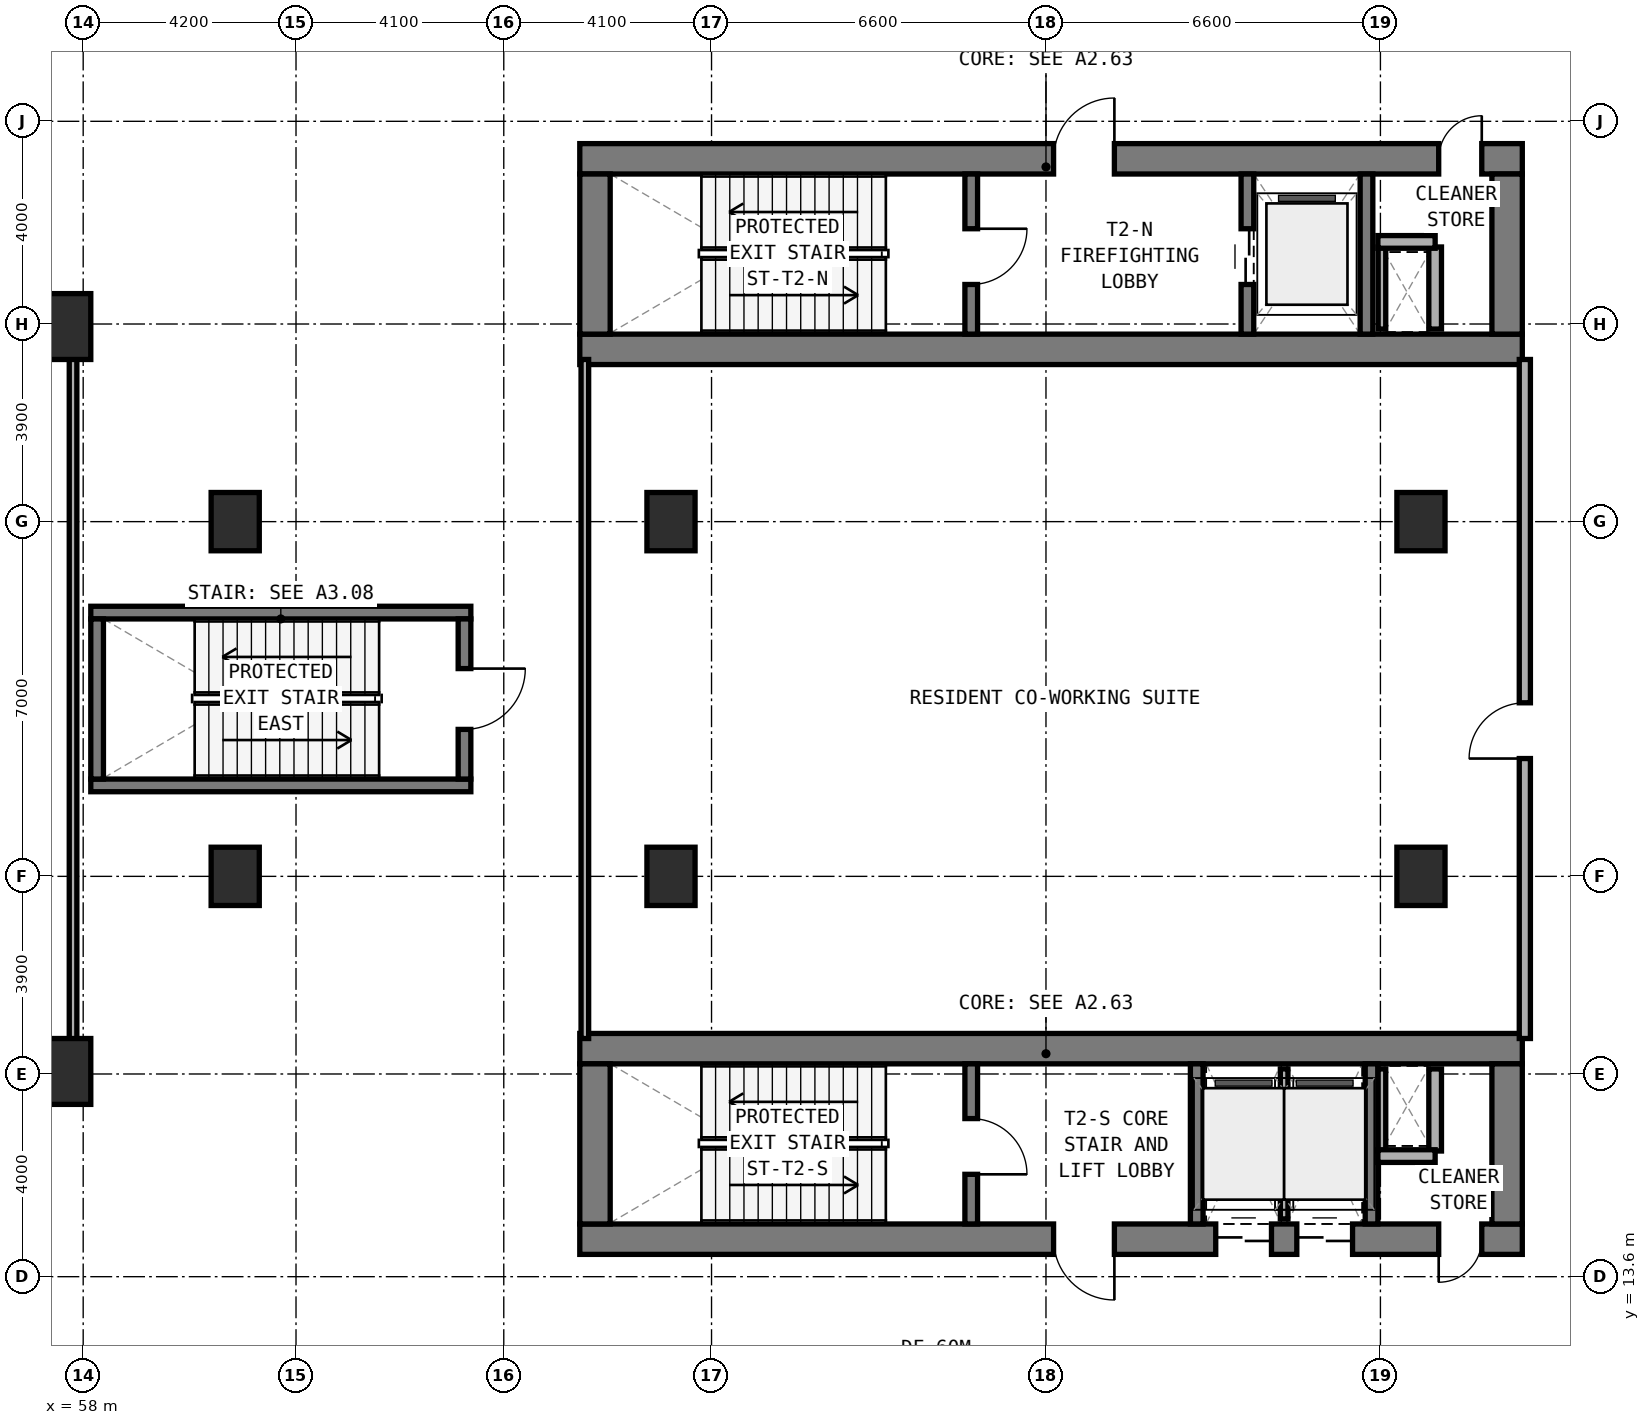
"""IFC4 building model, lengths in metres.
Left out: names, types, materials, properties, quantities, classifications, styles, units other than length and angle.
Written with IfcOpenShell. Run it as: python <this file> out.ifc"""

import sys

from ifc_helpers import new_model, si_unit, direction, frame, frame_2d, origin, origin_2d, place, context, subcontext, project, spatial, rectangle, extrude, element, fill, save


model = new_model("IFC4")
c1 = context("Model", 3, precision=1e-05, world=origin(), true_north=direction((0.0, 1.0)))
c2 = subcontext(c1, "Body", "Model", "MODEL_VIEW")
j1 = project(units=[si_unit("LENGTHUNIT", "METRE"), si_unit("PLANEANGLEUNIT", "RADIAN")], contexts=[c1])
p1 = place(None, origin())
s1 = spatial("IfcSite", under=j1, at=p1, CompositionType="ELEMENT")
p2 = place(p1, origin())
s2 = spatial("IfcBuilding", under=s1, at=p2, CompositionType="ELEMENT")
p3 = place(p2, frame((0.0, 0.0, 10.2)))
s3 = spatial("IfcBuildingStorey", under=s2, at=p3, CompositionType="ELEMENT", Elevation=10.2)
p4 = place(p3, frame((67.8, 31.9, 0.0), z_axis=(0.0, 0.0, 1.0), x_axis=(1.0, 0.0, 0.0)))
e1 = element("IfcWall", 1, at=p4, inside=s3, PredefinedType="SHEAR", context=c2, shape_type="SweptSolid", body=[
    extrude(rectangle(XDim=18.6, YDim=0.6, at=frame_2d((9.3, 0.0))), origin(), (0.0, 0.0, 1.0), 4.8),
])
p5 = place(p3, frame((67.8, 35.66, 0.0), z_axis=(0.0, 0.0, 1.0), x_axis=(1.0, 0.0, 0.0)))
e2 = element("IfcWall", 2, at=p5, inside=s3, PredefinedType="SHEAR", context=c2, shape_type="SweptSolid", body=[
    extrude(rectangle(XDim=18.6, YDim=0.6, at=frame_2d((9.3, 0.0))), origin(), (0.0, 0.0, 1.0), 4.8),
])
p6 = place(p5, frame((9.35, 0.0, 0.0)))
e3 = element("IfcOpeningElement", 3, at=p6, cuts=e2, PredefinedType="OPENING", context=c2, shape_type="SweptSolid", body=[
    extrude(rectangle(XDim=1.2, YDim=2.15, at=frame_2d((0.6, 1.075))), frame((0.0, 0.31, 0.0), z_axis=(0.0, -1.0, 0.0), x_axis=(1.0, 0.0, 0.0)), (0.0, 0.0, 1.0), 0.62),
])
p7 = place(p5, frame((16.95, 0.0, 0.0)))
e4 = element("IfcOpeningElement", 4, at=p7, cuts=e2, PredefinedType="OPENING", context=c2, shape_type="SweptSolid", body=[
    extrude(rectangle(XDim=0.85, YDim=2.1, at=frame_2d((0.425, 1.05))), frame((0.0, 0.31, 0.0), z_axis=(0.0, -1.0, 0.0), x_axis=(1.0, 0.0, 0.0)), (0.0, 0.0, 1.0), 0.62),
])
for number, where, z_axis, x_axis in (
    (5, (68.1, 32.2, 0.0), (0.0, 0.0, 1.0), (0.0, 1.0, 0.0)),
    (6, (86.1, 32.2, 0.0), (0.0, 0.0, 1.0), (0.0, 1.0, 0.0)),
):
    element("IfcWall", number, at=place(p3, frame(where, z_axis=z_axis, x_axis=x_axis)), inside=s3, PredefinedType="SHEAR", context=c2, shape_type="SweptSolid", body=[
        extrude(rectangle(XDim=3.16, YDim=0.6, at=frame_2d((1.58, 0.0))), origin(), (0.0, 0.0, 1.0), 4.8),
    ])
p8 = place(p3, frame((75.525, 32.2, 0.0), z_axis=(0.0, 0.0, 1.0), x_axis=(0.0, 1.0, 0.0)))
e7 = element("IfcWall", 7, at=p8, inside=s3, PredefinedType="STANDARD", context=c2, shape_type="SweptSolid", body=[
    extrude(rectangle(XDim=3.16, YDim=0.25, at=frame_2d((1.58, 0.0))), origin(), (0.0, 0.0, 1.0), 4.45),
])
p9 = place(p8, frame((0.98, 0.0, 0.0)))
e8 = element("IfcOpeningElement", 8, at=p9, cuts=e7, PredefinedType="OPENING", context=c2, shape_type="SweptSolid", body=[
    extrude(rectangle(XDim=1.1, YDim=2.15, at=frame_2d((0.55, 1.075))), frame((0.0, 0.135, 0.0), z_axis=(0.0, -1.0, 0.0), x_axis=(1.0, 0.0, 0.0)), (0.0, 0.0, 1.0), 0.27),
])
p10 = place(p3, frame((80.975, 32.2, 0.0), z_axis=(0.0, 0.0, 1.0), x_axis=(0.0, 1.0, 0.0)))
e9 = element("IfcWall", 9, at=p10, inside=s3, PredefinedType="STANDARD", context=c2, shape_type="SweptSolid", body=[
    extrude(rectangle(XDim=3.16, YDim=0.25, at=frame_2d((1.58, 0.0))), origin(), (0.0, 0.0, 1.0), 4.45),
])
p11 = place(p10, frame((0.98, 0.0, 0.0)))
e10 = element("IfcOpeningElement", 10, at=p11, cuts=e9, PredefinedType="OPENING", context=c2, shape_type="SweptSolid", body=[
    extrude(rectangle(XDim=1.1, YDim=2.15, at=frame_2d((0.55, 1.075))), frame((0.0, 0.135, 0.0), z_axis=(0.0, -1.0, 0.0), x_axis=(1.0, 0.0, 0.0)), (0.0, 0.0, 1.0), 0.27),
])
p12 = place(p3, frame((83.325, 32.2, 0.0), z_axis=(0.0, 0.0, 1.0), x_axis=(0.0, 1.0, 0.0)))
e11 = element("IfcWall", 11, at=p12, inside=s3, PredefinedType="STANDARD", context=c2, shape_type="SweptSolid", body=[
    extrude(rectangle(XDim=3.16, YDim=0.25, at=frame_2d((1.58, 0.0))), origin(), (0.0, 0.0, 1.0), 4.45),
])
p13 = place(p3, frame((67.8, 14.34, 0.0), z_axis=(0.0, 0.0, 1.0), x_axis=(1.0, 0.0, 0.0)))
e12 = element("IfcWall", 12, at=p13, inside=s3, PredefinedType="SHEAR", context=c2, shape_type="SweptSolid", body=[
    extrude(rectangle(XDim=18.6, YDim=0.6, at=frame_2d((9.3, 0.0))), origin(), (0.0, 0.0, 1.0), 4.8),
])
p14 = place(p13, frame((9.35, 0.0, 0.0)))
e13 = element("IfcOpeningElement", 13, at=p14, cuts=e12, PredefinedType="OPENING", context=c2, shape_type="SweptSolid", body=[
    extrude(rectangle(XDim=1.2, YDim=2.15, at=frame_2d((0.6, 1.075))), frame((0.0, 0.31, 0.0), z_axis=(0.0, -1.0, 0.0), x_axis=(1.0, 0.0, 0.0)), (0.0, 0.0, 1.0), 0.62),
])
p15 = place(p13, frame((16.95, 0.0, 0.0)))
e14 = element("IfcOpeningElement", 14, at=p15, cuts=e12, PredefinedType="OPENING", context=c2, shape_type="SweptSolid", body=[
    extrude(rectangle(XDim=0.85, YDim=2.1, at=frame_2d((0.425, 1.05))), frame((0.0, 0.31, 0.0), z_axis=(0.0, -1.0, 0.0), x_axis=(1.0, 0.0, 0.0)), (0.0, 0.0, 1.0), 0.62),
])
p16 = place(p13, frame((12.55, 0.0, 0.0)))
e15 = element("IfcOpeningElement", 15, at=p16, cuts=e12, PredefinedType="OPENING", context=c2, shape_type="SweptSolid", body=[
    extrude(rectangle(XDim=1.1, YDim=2.15, at=frame_2d((0.55, 1.075))), frame((0.0, 0.31, 0.0), z_axis=(0.0, -1.0, 0.0), x_axis=(1.0, 0.0, 0.0)), (0.0, 0.0, 1.0), 0.62),
])
p17 = place(p13, frame((14.15, 0.0, 0.0)))
e16 = element("IfcOpeningElement", 16, at=p17, cuts=e12, PredefinedType="OPENING", context=c2, shape_type="SweptSolid", body=[
    extrude(rectangle(XDim=1.1, YDim=2.15, at=frame_2d((0.55, 1.075))), frame((0.0, 0.31, 0.0), z_axis=(0.0, -1.0, 0.0), x_axis=(1.0, 0.0, 0.0)), (0.0, 0.0, 1.0), 0.62),
])
p18 = place(p3, frame((67.8, 18.1, 0.0), z_axis=(0.0, 0.0, 1.0), x_axis=(1.0, 0.0, 0.0)))
e17 = element("IfcWall", 17, at=p18, inside=s3, PredefinedType="SHEAR", context=c2, shape_type="SweptSolid", body=[
    extrude(rectangle(XDim=18.6, YDim=0.6, at=frame_2d((9.3, 0.0))), origin(), (0.0, 0.0, 1.0), 4.8),
])
for number, where, z_axis, x_axis in (
    (18, (68.1, 14.64, 0.0), (0.0, 0.0, 1.0), (0.0, 1.0, 0.0)),
    (19, (86.1, 14.64, 0.0), (0.0, 0.0, 1.0), (0.0, 1.0, 0.0)),
):
    element("IfcWall", number, at=place(p3, frame(where, z_axis=z_axis, x_axis=x_axis)), inside=s3, PredefinedType="SHEAR", context=c2, shape_type="SweptSolid", body=[
        extrude(rectangle(XDim=3.16, YDim=0.6, at=frame_2d((1.58, 0.0))), origin(), (0.0, 0.0, 1.0), 4.8),
    ])
p19 = place(p3, frame((75.525, 14.64, 0.0), z_axis=(0.0, 0.0, 1.0), x_axis=(0.0, 1.0, 0.0)))
e20 = element("IfcWall", 20, at=p19, inside=s3, PredefinedType="STANDARD", context=c2, shape_type="SweptSolid", body=[
    extrude(rectangle(XDim=3.16, YDim=0.25, at=frame_2d((1.58, 0.0))), origin(), (0.0, 0.0, 1.0), 4.45),
])
p20 = place(p19, frame((0.98, 0.0, 0.0)))
e21 = element("IfcOpeningElement", 21, at=p20, cuts=e20, PredefinedType="OPENING", context=c2, shape_type="SweptSolid", body=[
    extrude(rectangle(XDim=1.1, YDim=2.15, at=frame_2d((0.55, 1.075))), frame((0.0, 0.135, 0.0), z_axis=(0.0, -1.0, 0.0), x_axis=(1.0, 0.0, 0.0)), (0.0, 0.0, 1.0), 0.27),
])
for number, where, z_axis, x_axis in (
    (22, (79.975, 14.64, 0.0), (0.0, 0.0, 1.0), (0.0, 1.0, 0.0)),
    (23, (83.425, 14.64, 0.0), (0.0, 0.0, 1.0), (0.0, 1.0, 0.0)),
):
    element("IfcWall", number, at=place(p3, frame(where, z_axis=z_axis, x_axis=x_axis)), inside=s3, PredefinedType="STANDARD", context=c2, shape_type="SweptSolid", body=[
        extrude(rectangle(XDim=3.16, YDim=0.25, at=frame_2d((1.58, 0.0))), origin(), (0.0, 0.0, 1.0), 4.45),
    ])
for number, where, z_axis, x_axis in (
    (24, (58.15, 23.295, 0.0), (0.0, 0.0, 1.0), (1.0, 0.0, 0.0)),
    (25, (58.15, 26.705, 0.0), (0.0, 0.0, 1.0), (1.0, 0.0, 0.0)),
):
    element("IfcWall", number, at=place(p3, frame(where, z_axis=z_axis, x_axis=x_axis)), inside=s3, PredefinedType="STANDARD", context=c2, shape_type="SweptSolid", body=[
        extrude(rectangle(XDim=7.5, YDim=0.25, at=frame_2d((3.75, 0.0))), origin(), (0.0, 0.0, 1.0), 4.8),
    ])
p21 = place(p3, frame((58.275, 23.42, 0.0), z_axis=(0.0, 0.0, 1.0), x_axis=(0.0, 1.0, 0.0)))
e26 = element("IfcWall", 26, at=p21, inside=s3, PredefinedType="STANDARD", context=c2, shape_type="SweptSolid", body=[
    extrude(rectangle(XDim=3.16, YDim=0.25, at=frame_2d((1.58, 0.0))), origin(), (0.0, 0.0, 1.0), 4.8),
])
p22 = place(p3, frame((65.525, 23.42, 0.0), z_axis=(0.0, 0.0, 1.0), x_axis=(0.0, 1.0, 0.0)))
e27 = element("IfcWall", 27, at=p22, inside=s3, PredefinedType="STANDARD", context=c2, shape_type="SweptSolid", body=[
    extrude(rectangle(XDim=3.16, YDim=0.25, at=frame_2d((1.58, 0.0))), origin(), (0.0, 0.0, 1.0), 4.8),
])
p23 = place(p22, frame((0.98, 0.0, 0.0)))
e28 = element("IfcOpeningElement", 28, at=p23, cuts=e27, PredefinedType="OPENING", context=c2, shape_type="SweptSolid", body=[
    extrude(rectangle(XDim=1.2, YDim=2.15, at=frame_2d((0.6, 1.075))), frame((0.0, 0.135, 0.0), z_axis=(0.0, -1.0, 0.0), x_axis=(1.0, 0.0, 0.0)), (0.0, 0.0, 1.0), 0.27),
])
for number, where, z_axis, x_axis in (
    (29, (61.0, 21.5, 0.0), (0.0, 0.0, 1.0), (1.0, 0.0, 0.0)),
    (30, (61.0, 28.5, 0.0), (0.0, 0.0, 1.0), (1.0, 0.0, 0.0)),
    (31, (69.6, 21.5, 0.0), (0.0, 0.0, 1.0), (1.0, 0.0, 0.0)),
    (32, (69.6, 28.5, 0.0), (0.0, 0.0, 1.0), (1.0, 0.0, 0.0)),
    (33, (84.4, 21.5, 0.0), (0.0, 0.0, 1.0), (1.0, 0.0, 0.0)),
    (34, (84.4, 28.5, 0.0), (0.0, 0.0, 1.0), (1.0, 0.0, 0.0)),
):
    element("IfcColumn", number, at=place(p3, frame(where, z_axis=z_axis, x_axis=x_axis)), inside=s3, PredefinedType="COLUMN", context=c2, shape_type="SweptSolid", body=[
        extrude(rectangle(XDim=0.95, YDim=1.15, at=origin_2d()), origin(), (0.0, 0.0, 1.0), 4.8),
    ])
for number, where, z_axis, x_axis in (
    (35, (57.6, 17.65, 0.0), (0.0, 0.0, 1.0), (1.0, 0.0, 0.0)),
    (36, (57.6, 32.35, 0.0), (0.0, 0.0, 1.0), (1.0, 0.0, 0.0)),
):
    element("IfcColumn", number, at=place(p3, frame(where, z_axis=z_axis, x_axis=x_axis)), inside=s3, PredefinedType="COLUMN", context=c2, shape_type="SweptSolid", body=[
        extrude(rectangle(XDim=1.1, YDim=1.3, at=origin_2d()), origin(), (0.0, 0.0, 1.0), 4.8),
    ])
p24 = place(p3, frame((83.63, 32.3, 0.0), z_axis=(0.0, 0.0, 1.0), x_axis=(0.0, 1.0, 0.0)))
e37 = element("IfcWall", 37, at=p24, inside=s3, PredefinedType="PARTITIONING", context=c2, shape_type="SweptSolid", body=[
    extrude(rectangle(XDim=1.62, YDim=0.15, at=frame_2d((0.81, 0.0))), origin(), (0.0, 0.0, 1.0), 3.925),
])
p25 = place(p3, frame((84.68, 32.3, 0.0), z_axis=(0.0, 0.0, 1.0), x_axis=(0.0, 1.0, 0.0)))
e38 = element("IfcWall", 38, at=p25, inside=s3, PredefinedType="SOLIDWALL", context=c2, shape_type="SweptSolid", body=[
    extrude(rectangle(XDim=1.62, YDim=0.25, at=frame_2d((0.81, 0.0))), origin(), (0.0, 0.0, 1.0), 4.45),
])
p26 = place(p3, frame((83.55, 34.02, 0.0), z_axis=(0.0, 0.0, 1.0), x_axis=(1.0, 0.0, 0.0)))
e39 = element("IfcWall", 39, at=p26, inside=s3, PredefinedType="SOLIDWALL", context=c2, shape_type="SweptSolid", body=[
    extrude(rectangle(XDim=1.13, YDim=0.25, at=frame_2d((0.565, 0.0))), origin(), (0.0, 0.0, 1.0), 4.45),
])
p27 = place(p3, frame((83.63, 16.08, 0.0), z_axis=(0.0, 0.0, 1.0), x_axis=(0.0, 1.0, 0.0)))
e40 = element("IfcWall", 40, at=p27, inside=s3, PredefinedType="PARTITIONING", context=c2, shape_type="SweptSolid", body=[
    extrude(rectangle(XDim=1.62, YDim=0.15, at=frame_2d((0.81, 0.0))), origin(), (0.0, 0.0, 1.0), 3.925),
])
p28 = place(p3, frame((84.68, 16.08, 0.0), z_axis=(0.0, 0.0, 1.0), x_axis=(0.0, 1.0, 0.0)))
e41 = element("IfcWall", 41, at=p28, inside=s3, PredefinedType="SOLIDWALL", context=c2, shape_type="SweptSolid", body=[
    extrude(rectangle(XDim=1.62, YDim=0.25, at=frame_2d((0.81, 0.0))), origin(), (0.0, 0.0, 1.0), 4.45),
])
p29 = place(p3, frame((83.55, 15.98, 0.0), z_axis=(0.0, 0.0, 1.0), x_axis=(1.0, 0.0, 0.0)))
e42 = element("IfcWall", 42, at=p29, inside=s3, PredefinedType="SOLIDWALL", context=c2, shape_type="SweptSolid", body=[
    extrude(rectangle(XDim=1.13, YDim=0.25, at=frame_2d((0.565, 0.0))), origin(), (0.0, 0.0, 1.0), 4.45),
])
p30 = place(p3, frame((81.7, 14.74, 0.0), z_axis=(0.0, 0.0, 1.0), x_axis=(0.0, 1.0, 0.0)))
e43 = element("IfcWall", 43, at=p30, inside=s3, PredefinedType="PARTITIONING", context=c2, shape_type="SweptSolid", body=[
    extrude(rectangle(XDim=2.96, YDim=0.15, at=frame_2d((1.48, 0.0))), origin(), (0.0, 0.0, 1.0), 4.45),
])
p31 = place(p3, frame((57.8, 18.1, 0.0), z_axis=(0.0, 0.0, 1.0), x_axis=(0.0, 1.0, 0.0)))
e44 = element("IfcWall", 44, at=p31, inside=s3, PredefinedType="PARTITIONING", context=c2, shape_type="SweptSolid", body=[
    extrude(rectangle(XDim=13.8, YDim=0.15, at=frame_2d((6.9, 0.0))), origin(), (0.0, 0.0, 1.0), 3.725),
])
for number, where, z_axis, x_axis in (
    (45, (41.1, 18.0, 0.0), (0.0, 0.0, 1.0), (1.0, 0.0, 0.0)),
    (46, (41.1, 32.0, 0.0), (0.0, 0.0, 1.0), (1.0, 0.0, 0.0)),
):
    element("IfcWall", number, at=place(p3, frame(where, z_axis=z_axis, x_axis=x_axis)), inside=s3, PredefinedType="PARTITIONING", context=c2, shape_type="SweptSolid", body=[
        extrude(rectangle(XDim=16.6, YDim=0.15, at=frame_2d((8.3, 0.0))), origin(), (0.0, 0.0, 1.0), 3.725),
    ])
p32 = place(p3, frame((67.9, 18.3, 0.0), z_axis=(0.0, 0.0, 1.0), x_axis=(0.0, 1.0, 0.0)))
e47 = element("IfcWall", 47, at=p32, inside=s3, PredefinedType="PARTITIONING", context=c2, shape_type="SweptSolid", body=[
    extrude(rectangle(XDim=13.4, YDim=0.15, at=frame_2d((6.7, 0.0))), origin(), (0.0, 0.0, 1.0), 3.925),
])
p33 = place(p3, frame((86.45, 18.3, 0.0), z_axis=(0.0, 0.0, 1.0), x_axis=(0.0, 1.0, 0.0)))
e48 = element("IfcWall", 48, at=p33, inside=s3, PredefinedType="SOLIDWALL", context=c2, shape_type="SweptSolid", body=[
    extrude(rectangle(XDim=13.4, YDim=0.22, at=frame_2d((6.7, 0.0))), origin(), (0.0, 0.0, 1.0), 3.925),
])
p34 = place(p33, frame((5.525, 0.0, 0.0)))
e49 = element("IfcOpeningElement", 49, at=p34, cuts=e48, PredefinedType="OPENING", context=c2, shape_type="SweptSolid", body=[
    extrude(rectangle(XDim=1.1, YDim=2.1, at=frame_2d((0.55, 1.05))), frame((0.0, 0.12, 0.0), z_axis=(0.0, -1.0, 0.0), x_axis=(1.0, 0.0, 0.0)), (0.0, 0.0, 1.0), 0.24),
])
p35 = place(p9, frame((1.1, 0.0, 0.0), z_axis=(0.0, 0.0, 1.0), x_axis=(-1.0, 0.0, 0.0)))
e50 = element("IfcDoor", 50, at=p35, inside=s3, OperationType="SINGLE_SWING_LEFT", PredefinedType="DOOR", context=c2, shape_type="SweptSolid", body=[
    extrude(rectangle(XDim=1.1, YDim=2.15, at=frame_2d((0.55, 1.075))), frame((0.0, 0.025, 0.0), z_axis=(0.0, -1.0, 0.0), x_axis=(1.0, 0.0, 0.0)), (0.0, 0.0, 1.0), 0.05),
])
fill(e8, e50)
p36 = place(p6, origin())
e51 = element("IfcDoor", 51, at=p36, inside=s3, OperationType="SINGLE_SWING_RIGHT", PredefinedType="DOOR", context=c2, shape_type="SweptSolid", body=[
    extrude(rectangle(XDim=1.2, YDim=2.15, at=frame_2d((0.6, 1.075))), frame((0.0, 0.025, 0.0), z_axis=(0.0, -1.0, 0.0), x_axis=(1.0, 0.0, 0.0)), (0.0, 0.0, 1.0), 0.05),
])
fill(e3, e51)
p37 = place(p11, origin())
e52 = element("IfcDoor", 52, at=p37, inside=s3, OperationType="DOUBLE_DOOR_SLIDING", PredefinedType="DOOR", context=c2, shape_type="SweptSolid", body=[
    extrude(rectangle(XDim=1.1, YDim=2.15, at=frame_2d((0.55, 1.075))), frame((0.0, 0.025, 0.0), z_axis=(0.0, -1.0, 0.0), x_axis=(1.0, 0.0, 0.0)), (0.0, 0.0, 1.0), 0.05),
])
fill(e10, e52)
p38 = place(p7, origin())
e53 = element("IfcDoor", 53, at=p38, inside=s3, OperationType="SINGLE_SWING_RIGHT", PredefinedType="DOOR", context=c2, shape_type="SweptSolid", body=[
    extrude(rectangle(XDim=0.85, YDim=2.1, at=frame_2d((0.425, 1.05))), frame((0.0, 0.025, 0.0), z_axis=(0.0, -1.0, 0.0), x_axis=(1.0, 0.0, 0.0)), (0.0, 0.0, 1.0), 0.05),
])
fill(e4, e53)
p39 = place(p20, frame((1.1, 0.0, 0.0), z_axis=(0.0, 0.0, 1.0), x_axis=(-1.0, 0.0, 0.0)))
e54 = element("IfcDoor", 54, at=p39, inside=s3, OperationType="SINGLE_SWING_RIGHT", PredefinedType="DOOR", context=c2, shape_type="SweptSolid", body=[
    extrude(rectangle(XDim=1.1, YDim=2.15, at=frame_2d((0.55, 1.075))), frame((0.0, 0.025, 0.0), z_axis=(0.0, -1.0, 0.0), x_axis=(1.0, 0.0, 0.0)), (0.0, 0.0, 1.0), 0.05),
])
fill(e21, e54)
p40 = place(p14, frame((1.2, 0.0, 0.0), z_axis=(0.0, 0.0, 1.0), x_axis=(-1.0, 0.0, 0.0)))
e55 = element("IfcDoor", 55, at=p40, inside=s3, OperationType="SINGLE_SWING_LEFT", PredefinedType="DOOR", context=c2, shape_type="SweptSolid", body=[
    extrude(rectangle(XDim=1.2, YDim=2.15, at=frame_2d((0.6, 1.075))), frame((0.0, 0.025, 0.0), z_axis=(0.0, -1.0, 0.0), x_axis=(1.0, 0.0, 0.0)), (0.0, 0.0, 1.0), 0.05),
])
fill(e13, e55)
p41 = place(p15, frame((0.85, 0.0, 0.0), z_axis=(0.0, 0.0, 1.0), x_axis=(-1.0, 0.0, 0.0)))
e56 = element("IfcDoor", 56, at=p41, inside=s3, OperationType="SINGLE_SWING_RIGHT", PredefinedType="DOOR", context=c2, shape_type="SweptSolid", body=[
    extrude(rectangle(XDim=0.85, YDim=2.1, at=frame_2d((0.425, 1.05))), frame((0.0, 0.025, 0.0), z_axis=(0.0, -1.0, 0.0), x_axis=(1.0, 0.0, 0.0)), (0.0, 0.0, 1.0), 0.05),
])
fill(e14, e56)
p42 = place(p16, frame((1.1, 0.0, 0.0), z_axis=(0.0, 0.0, 1.0), x_axis=(-1.0, 0.0, 0.0)))
e57 = element("IfcDoor", 57, at=p42, inside=s3, OperationType="DOUBLE_DOOR_SLIDING", PredefinedType="DOOR", context=c2, shape_type="SweptSolid", body=[
    extrude(rectangle(XDim=1.1, YDim=2.15, at=frame_2d((0.55, 1.075))), frame((0.0, 0.025, 0.0), z_axis=(0.0, -1.0, 0.0), x_axis=(1.0, 0.0, 0.0)), (0.0, 0.0, 1.0), 0.05),
])
fill(e15, e57)
p43 = place(p17, frame((1.1, 0.0, 0.0), z_axis=(0.0, 0.0, 1.0), x_axis=(-1.0, 0.0, 0.0)))
e58 = element("IfcDoor", 58, at=p43, inside=s3, OperationType="DOUBLE_DOOR_SLIDING", PredefinedType="DOOR", context=c2, shape_type="SweptSolid", body=[
    extrude(rectangle(XDim=1.1, YDim=2.15, at=frame_2d((0.55, 1.075))), frame((0.0, 0.025, 0.0), z_axis=(0.0, -1.0, 0.0), x_axis=(1.0, 0.0, 0.0)), (0.0, 0.0, 1.0), 0.05),
])
fill(e16, e58)
p44 = place(p23, frame((1.2, 0.0, 0.0), z_axis=(0.0, 0.0, 1.0), x_axis=(-1.0, 0.0, 0.0)))
e59 = element("IfcDoor", 59, at=p44, inside=s3, OperationType="SINGLE_SWING_LEFT", PredefinedType="DOOR", context=c2, shape_type="SweptSolid", body=[
    extrude(rectangle(XDim=1.2, YDim=2.15, at=frame_2d((0.6, 1.075))), frame((0.0, 0.025, 0.0), z_axis=(0.0, -1.0, 0.0), x_axis=(1.0, 0.0, 0.0)), (0.0, 0.0, 1.0), 0.05),
])
fill(e28, e59)
p45 = place(p34, origin())
e60 = element("IfcDoor", 60, at=p45, inside=s3, OperationType="SINGLE_SWING_LEFT", PredefinedType="DOOR", context=c2, shape_type="SweptSolid", body=[
    extrude(rectangle(XDim=1.1, YDim=2.1, at=frame_2d((0.55, 1.05))), frame((0.0, 0.025, 0.0), z_axis=(0.0, -1.0, 0.0), x_axis=(1.0, 0.0, 0.0)), (0.0, 0.0, 1.0), 0.05),
])
fill(e49, e60)
save(model, sys.argv[1])
